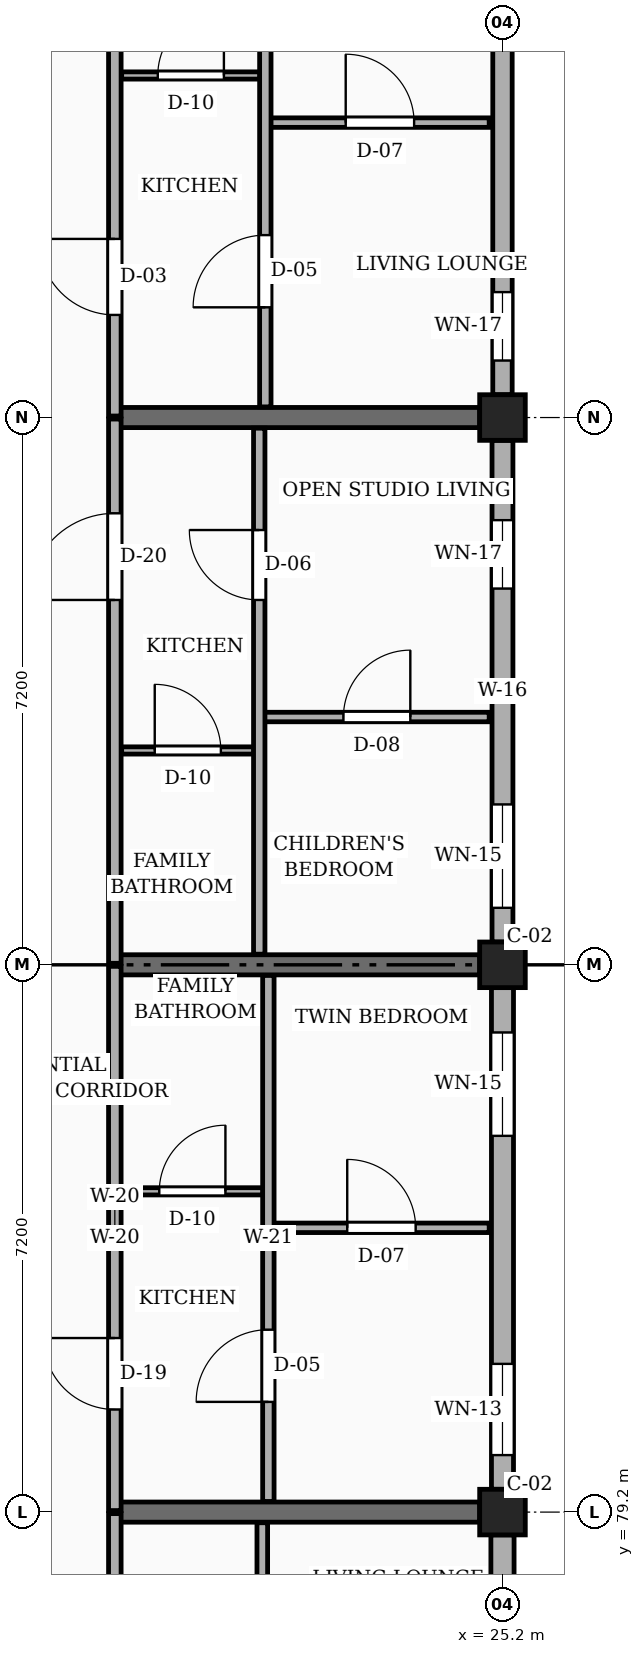
"""IFC4 building model, lengths in metres.
Left out: names, types, materials, properties, quantities, classifications, styles, units other than length and angle.
Written with IfcOpenShell. Run it as: python <this file> out.ifc"""

import sys

from ifc_helpers import new_model, si_unit, direction, frame, frame_2d, origin, origin_2d, place, context, subcontext, project, spatial, rectangle, extrude, element, fill, save


model = new_model("IFC4")
c1 = context("Model", 3, precision=1e-05, world=origin(), true_north=direction((0.0, 1.0)))
c2 = subcontext(c1, "Body", "Model", "MODEL_VIEW")
j1 = project(units=[si_unit("LENGTHUNIT", "METRE"), si_unit("PLANEANGLEUNIT", "RADIAN")], contexts=[c1])
p1 = place(None, origin())
s1 = spatial("IfcSite", under=j1, at=p1, CompositionType="ELEMENT")
p2 = place(p1, origin())
s2 = spatial("IfcBuilding", under=s1, at=p2, CompositionType="ELEMENT")
p3 = place(p2, frame((0.0, 0.0, 4.5)))
s3 = spatial("IfcBuildingStorey", under=s2, at=p3, CompositionType="ELEMENT", Elevation=4.5)
for number, where, z_axis, x_axis in (
    (1, (25.2, 79.2, 0.0), (0.0, 0.0, 1.0), (1.0, 0.0, 0.0)),
    (2, (25.2, 86.4, 0.0), (0.0, 0.0, 1.0), (1.0, 0.0, 0.0)),
    (3, (25.2, 93.6, 0.0), (0.0, 0.0, 1.0), (1.0, 0.0, 0.0)),
):
    element("IfcColumn", number, at=place(p3, frame(where, z_axis=z_axis, x_axis=x_axis)), inside=s3, PredefinedType="COLUMN", context=c2, shape_type="SweptSolid", body=[
        extrude(rectangle(XDim=0.6, YDim=0.6, at=origin_2d()), origin(), (0.0, 0.0, 1.0), 3.15),
    ])
for number, where, z_axis, x_axis in (
    (4, (20.1, 79.2, 0.0), (0.0, 0.0, 1.0), (1.0, 0.0, 0.0)),
    (5, (20.1, 86.4, 0.0), (0.0, 0.0, 1.0), (1.0, 0.0, 0.0)),
    (6, (20.1, 93.6, 0.0), (0.0, 0.0, 1.0), (1.0, 0.0, 0.0)),
):
    element("IfcWall", number, at=place(p3, frame(where, z_axis=z_axis, x_axis=x_axis)), inside=s3, PredefinedType="SOLIDWALL", context=c2, shape_type="SweptSolid", body=[
        extrude(rectangle(XDim=4.8, YDim=0.265, at=frame_2d((2.4, 0.0))), origin(), (0.0, 0.0, 1.0), 2.21),
    ])
p4 = place(p3, frame((25.2, 72.3, 0.0), z_axis=(0.0, 0.0, 1.0), x_axis=(0.0, 1.0, 0.0)))
e7 = element("IfcWall", 7, at=p4, inside=s3, PredefinedType="SOLIDWALL", context=c2, shape_type="SweptSolid", body=[
    extrude(rectangle(XDim=6.6, YDim=0.305, at=frame_2d((3.3, 0.0))), origin(), (0.0, 0.0, 1.0), 2.48),
])
p5 = place(p4, frame((0.45, 0.0, 0.78)))
e8 = element("IfcOpeningElement", 8, at=p5, cuts=e7, PredefinedType="OPENING", context=c2, shape_type="SweptSolid", body=[
    extrude(rectangle(XDim=1.04, YDim=1.26, at=frame_2d((0.52, 0.63))), frame((0.0, 0.163, 0.0), z_axis=(0.0, -1.0, 0.0), x_axis=(1.0, 0.0, 0.0)), (0.0, 0.0, 1.0), 0.325),
])
p6 = place(p4, frame((4.65, 0.0, 0.78)))
e9 = element("IfcOpeningElement", 9, at=p6, cuts=e7, PredefinedType="OPENING", context=c2, shape_type="SweptSolid", body=[
    extrude(rectangle(XDim=1.2, YDim=1.26, at=frame_2d((0.6, 0.63))), frame((0.0, 0.163, 0.0), z_axis=(0.0, -1.0, 0.0), x_axis=(1.0, 0.0, 0.0)), (0.0, 0.0, 1.0), 0.325),
])
p7 = place(p3, frame((25.2, 79.5, 0.0), z_axis=(0.0, 0.0, 1.0), x_axis=(0.0, 1.0, 0.0)))
e10 = element("IfcWall", 10, at=p7, inside=s3, PredefinedType="SOLIDWALL", context=c2, shape_type="SweptSolid", body=[
    extrude(rectangle(XDim=6.6, YDim=0.29, at=frame_2d((3.3, 0.0))), origin(), (0.0, 0.0, 1.0), 2.48),
])
p8 = place(p7, frame((0.45, 0.0, 0.78)))
e11 = element("IfcOpeningElement", 11, at=p8, cuts=e10, PredefinedType="OPENING", context=c2, shape_type="SweptSolid", body=[
    extrude(rectangle(XDim=1.2, YDim=1.26, at=frame_2d((0.6, 0.63))), frame((0.0, 0.155, 0.0), z_axis=(0.0, -1.0, 0.0), x_axis=(1.0, 0.0, 0.0)), (0.0, 0.0, 1.0), 0.31),
])
p9 = place(p7, frame((4.65, 0.0, 0.78)))
e12 = element("IfcOpeningElement", 12, at=p9, cuts=e10, PredefinedType="OPENING", context=c2, shape_type="SweptSolid", body=[
    extrude(rectangle(XDim=1.36, YDim=1.26, at=frame_2d((0.68, 0.63))), frame((0.0, 0.155, 0.0), z_axis=(0.0, -1.0, 0.0), x_axis=(1.0, 0.0, 0.0)), (0.0, 0.0, 1.0), 0.31),
])
p10 = place(p3, frame((25.2, 86.7, 0.0), z_axis=(0.0, 0.0, 1.0), x_axis=(0.0, 1.0, 0.0)))
e13 = element("IfcWall", 13, at=p10, inside=s3, PredefinedType="SOLIDWALL", context=c2, shape_type="SweptSolid", body=[
    extrude(rectangle(XDim=6.6, YDim=0.275, at=frame_2d((3.3, 0.0))), origin(), (0.0, 0.0, 1.0), 2.48),
])
p11 = place(p10, frame((0.45, 0.0, 0.78)))
e14 = element("IfcOpeningElement", 14, at=p11, cuts=e13, PredefinedType="OPENING", context=c2, shape_type="SweptSolid", body=[
    extrude(rectangle(XDim=1.36, YDim=1.26, at=frame_2d((0.68, 0.63))), frame((0.0, 0.147, 0.0), z_axis=(0.0, -1.0, 0.0), x_axis=(1.0, 0.0, 0.0)), (0.0, 0.0, 1.0), 0.295),
])
p12 = place(p10, frame((4.65, 0.0, 0.78)))
e15 = element("IfcOpeningElement", 15, at=p12, cuts=e13, PredefinedType="OPENING", context=c2, shape_type="SweptSolid", body=[
    extrude(rectangle(XDim=0.9, YDim=1.36, at=frame_2d((0.45, 0.68))), frame((0.0, 0.147, 0.0), z_axis=(0.0, -1.0, 0.0), x_axis=(1.0, 0.0, 0.0)), (0.0, 0.0, 1.0), 0.295),
])
p13 = place(p3, frame((25.2, 93.9, 0.0), z_axis=(0.0, 0.0, 1.0), x_axis=(0.0, 1.0, 0.0)))
e16 = element("IfcWall", 16, at=p13, inside=s3, PredefinedType="SOLIDWALL", context=c2, shape_type="SweptSolid", body=[
    extrude(rectangle(XDim=6.6, YDim=0.255, at=frame_2d((3.3, 0.0))), origin(), (0.0, 0.0, 1.0), 2.48),
])
p14 = place(p13, frame((0.45, 0.0, 0.78)))
e17 = element("IfcOpeningElement", 17, at=p14, cuts=e16, PredefinedType="OPENING", context=c2, shape_type="SweptSolid", body=[
    extrude(rectangle(XDim=0.9, YDim=1.36, at=frame_2d((0.45, 0.68))), frame((0.0, 0.137, 0.0), z_axis=(0.0, -1.0, 0.0), x_axis=(1.0, 0.0, 0.0)), (0.0, 0.0, 1.0), 0.275),
])
p15 = place(p13, frame((4.65, 0.0, 0.78)))
e18 = element("IfcOpeningElement", 18, at=p15, cuts=e16, PredefinedType="OPENING", context=c2, shape_type="SweptSolid", body=[
    extrude(rectangle(XDim=1.06, YDim=1.36, at=frame_2d((0.53, 0.68))), frame((0.0, 0.137, 0.0), z_axis=(0.0, -1.0, 0.0), x_axis=(1.0, 0.0, 0.0)), (0.0, 0.0, 1.0), 0.275),
])
p16 = place(p3, frame((20.1, 72.02, 0.0), z_axis=(0.0, 0.0, 1.0), x_axis=(0.0, 1.0, 0.0)))
e19 = element("IfcWall", 19, at=p16, inside=s3, PredefinedType="PARTITIONING", context=c2, shape_type="SweptSolid", body=[
    extrude(rectangle(XDim=7.16, YDim=0.165, at=frame_2d((3.58, 0.0))), origin(), (0.0, 0.0, 1.0), 2.345),
])
p17 = place(p16, frame((4.78, 0.0, 0.0)))
e20 = element("IfcOpeningElement", 20, at=p17, cuts=e19, PredefinedType="OPENING", context=c2, shape_type="SweptSolid", body=[
    extrude(rectangle(XDim=1.0, YDim=2.15, at=frame_2d((0.5, 1.075))), frame((0.0, 0.093, 0.0), z_axis=(0.0, -1.0, 0.0), x_axis=(1.0, 0.0, 0.0)), (0.0, 0.0, 1.0), 0.185),
])
p18 = place(p3, frame((20.1, 79.22, 0.0), z_axis=(0.0, 0.0, 1.0), x_axis=(0.0, 1.0, 0.0)))
e21 = element("IfcWall", 21, at=p18, inside=s3, PredefinedType="PARTITIONING", context=c2, shape_type="SweptSolid", body=[
    extrude(rectangle(XDim=7.16, YDim=0.165, at=frame_2d((3.58, 0.0))), origin(), (0.0, 0.0, 1.0), 2.345),
])
p19 = place(p18, frame((1.33, 0.0, 0.0)))
e22 = element("IfcOpeningElement", 22, at=p19, cuts=e21, PredefinedType="OPENING", context=c2, shape_type="SweptSolid", body=[
    extrude(rectangle(XDim=0.94, YDim=2.12, at=frame_2d((0.47, 1.06))), frame((0.0, 0.093, 0.0), z_axis=(0.0, -1.0, 0.0), x_axis=(1.0, 0.0, 0.0)), (0.0, 0.0, 1.0), 0.185),
])
p20 = place(p3, frame((20.1, 86.42, 0.0), z_axis=(0.0, 0.0, 1.0), x_axis=(0.0, 1.0, 0.0)))
e23 = element("IfcWall", 23, at=p20, inside=s3, PredefinedType="PARTITIONING", context=c2, shape_type="SweptSolid", body=[
    extrude(rectangle(XDim=7.16, YDim=0.165, at=frame_2d((3.58, 0.0))), origin(), (0.0, 0.0, 1.0), 2.345),
])
p21 = place(p20, frame((4.78, 0.0, 0.0)))
e24 = element("IfcOpeningElement", 24, at=p21, cuts=e23, PredefinedType="OPENING", context=c2, shape_type="SweptSolid", body=[
    extrude(rectangle(XDim=1.14, YDim=2.18, at=frame_2d((0.57, 1.09))), frame((0.0, 0.093, 0.0), z_axis=(0.0, -1.0, 0.0), x_axis=(1.0, 0.0, 0.0)), (0.0, 0.0, 1.0), 0.185),
])
p22 = place(p3, frame((20.1, 93.62, 0.0), z_axis=(0.0, 0.0, 1.0), x_axis=(0.0, 1.0, 0.0)))
e25 = element("IfcWall", 25, at=p22, inside=s3, PredefinedType="PARTITIONING", context=c2, shape_type="SweptSolid", body=[
    extrude(rectangle(XDim=7.005, YDim=0.165, at=frame_2d((3.502, 0.0))), origin(), (0.0, 0.0, 1.0), 2.345),
])
p23 = place(p22, frame((1.33, 0.0, 0.0)))
e26 = element("IfcOpeningElement", 26, at=p23, cuts=e25, PredefinedType="OPENING", context=c2, shape_type="SweptSolid", body=[
    extrude(rectangle(XDim=1.0, YDim=2.15, at=frame_2d((0.5, 1.075))), frame((0.0, 0.093, 0.0), z_axis=(0.0, -1.0, 0.0), x_axis=(1.0, 0.0, 0.0)), (0.0, 0.0, 1.0), 0.185),
])
p24 = place(p3, frame((22.04, 72.14, 0.0), z_axis=(0.0, 0.0, 1.0), x_axis=(0.0, 1.0, 0.0)))
e27 = element("IfcWall", 27, at=p24, inside=s3, PredefinedType="PARTITIONING", context=c2, shape_type="SweptSolid", body=[
    extrude(rectangle(XDim=6.92, YDim=0.14, at=frame_2d((3.46, 0.0))), origin(), (0.0, 0.0, 1.0), 2.345),
])
p25 = place(p24, frame((4.66, 0.0, 0.0)))
e28 = element("IfcOpeningElement", 28, at=p25, cuts=e27, PredefinedType="OPENING", context=c2, shape_type="SweptSolid", body=[
    extrude(rectangle(XDim=0.92, YDim=2.1, at=frame_2d((0.46, 1.05))), frame((0.0, 0.08, 0.0), z_axis=(0.0, -1.0, 0.0), x_axis=(1.0, 0.0, 0.0)), (0.0, 0.0, 1.0), 0.16),
])
p26 = place(p3, frame((22.19, 82.94, 0.0), z_axis=(0.0, 0.0, 1.0), x_axis=(1.0, 0.0, 0.0)))
e29 = element("IfcWall", 29, at=p26, inside=s3, PredefinedType="PARTITIONING", context=c2, shape_type="SweptSolid", body=[
    extrude(rectangle(XDim=2.835, YDim=0.125, at=frame_2d((1.417, 0.0))), origin(), (0.0, 0.0, 1.0), 2.345),
])
p27 = place(p26, frame((0.968, 0.0, 0.0)))
e30 = element("IfcOpeningElement", 30, at=p27, cuts=e29, PredefinedType="OPENING", context=c2, shape_type="SweptSolid", body=[
    extrude(rectangle(XDim=0.9, YDim=2.1, at=frame_2d((0.45, 1.05))), frame((0.0, 0.073, 0.0), z_axis=(0.0, -1.0, 0.0), x_axis=(1.0, 0.0, 0.0)), (0.0, 0.0, 1.0), 0.145),
])
p28 = place(p3, frame((20.19, 83.42, 0.0), z_axis=(0.0, 0.0, 1.0), x_axis=(1.0, 0.0, 0.0)))
e31 = element("IfcWall", 31, at=p28, inside=s3, PredefinedType="PARTITIONING", context=c2, shape_type="SweptSolid", body=[
    extrude(rectangle(XDim=1.86, YDim=0.095, at=frame_2d((0.93, 0.0))), origin(), (0.0, 0.0, 1.0), 2.345),
])
p29 = place(p28, frame((0.495, 0.0, 0.0)))
e32 = element("IfcOpeningElement", 32, at=p29, cuts=e31, PredefinedType="OPENING", context=c2, shape_type="SweptSolid", body=[
    extrude(rectangle(XDim=0.87, YDim=2.05, at=frame_2d((0.435, 1.025))), frame((0.0, 0.058, 0.0), z_axis=(0.0, -1.0, 0.0), x_axis=(1.0, 0.0, 0.0)), (0.0, 0.0, 1.0), 0.115),
])
p30 = place(p3, frame((22.12, 79.34, 0.0), z_axis=(0.0, 0.0, 1.0), x_axis=(0.0, 1.0, 0.0)))
e33 = element("IfcWall", 33, at=p30, inside=s3, PredefinedType="PARTITIONING", context=c2, shape_type="SweptSolid", body=[
    extrude(rectangle(XDim=6.92, YDim=0.15, at=frame_2d((3.46, 0.0))), origin(), (0.0, 0.0, 1.0), 2.345),
])
p31 = place(p30, frame((1.31, 0.0, 0.0)))
e34 = element("IfcOpeningElement", 34, at=p31, cuts=e33, PredefinedType="OPENING", context=c2, shape_type="SweptSolid", body=[
    extrude(rectangle(XDim=0.95, YDim=2.1, at=frame_2d((0.475, 1.05))), frame((0.0, 0.085, 0.0), z_axis=(0.0, -1.0, 0.0), x_axis=(1.0, 0.0, 0.0)), (0.0, 0.0, 1.0), 0.17),
])
p32 = place(p3, frame((22.07, 89.66, 0.0), z_axis=(0.0, 0.0, 1.0), x_axis=(1.0, 0.0, 0.0)))
e35 = element("IfcWall", 35, at=p32, inside=s3, PredefinedType="PARTITIONING", context=c2, shape_type="SweptSolid", body=[
    extrude(rectangle(XDim=2.955, YDim=0.125, at=frame_2d((1.478, 0.0))), origin(), (0.0, 0.0, 1.0), 2.345),
])
p33 = place(p32, frame((1.038, 0.0, 0.0)))
e36 = element("IfcOpeningElement", 36, at=p33, cuts=e35, PredefinedType="OPENING", context=c2, shape_type="SweptSolid", body=[
    extrude(rectangle(XDim=0.88, YDim=2.08, at=frame_2d((0.44, 1.04))), frame((0.0, 0.073, 0.0), z_axis=(0.0, -1.0, 0.0), x_axis=(1.0, 0.0, 0.0)), (0.0, 0.0, 1.0), 0.145),
])
p34 = place(p3, frame((20.19, 89.22, 0.0), z_axis=(0.0, 0.0, 1.0), x_axis=(1.0, 0.0, 0.0)))
e37 = element("IfcWall", 37, at=p34, inside=s3, PredefinedType="PARTITIONING", context=c2, shape_type="SweptSolid", body=[
    extrude(rectangle(XDim=1.74, YDim=0.095, at=frame_2d((0.87, 0.0))), origin(), (0.0, 0.0, 1.0), 2.345),
])
p35 = place(p34, frame((0.435, 0.0, 0.0)))
e38 = element("IfcOpeningElement", 38, at=p35, cuts=e37, PredefinedType="OPENING", context=c2, shape_type="SweptSolid", body=[
    extrude(rectangle(XDim=0.87, YDim=2.05, at=frame_2d((0.435, 1.025))), frame((0.0, 0.058, 0.0), z_axis=(0.0, -1.0, 0.0), x_axis=(1.0, 0.0, 0.0)), (0.0, 0.0, 1.0), 0.115),
])
p36 = place(p3, frame((22.0, 86.54, 0.0), z_axis=(0.0, 0.0, 1.0), x_axis=(0.0, 1.0, 0.0)))
e39 = element("IfcWall", 39, at=p36, inside=s3, PredefinedType="PARTITIONING", context=c2, shape_type="SweptSolid", body=[
    extrude(rectangle(XDim=6.92, YDim=0.15, at=frame_2d((3.46, 0.0))), origin(), (0.0, 0.0, 1.0), 2.345),
])
p37 = place(p36, frame((4.66, 0.0, 0.0)))
e40 = element("IfcOpeningElement", 40, at=p37, cuts=e39, PredefinedType="OPENING", context=c2, shape_type="SweptSolid", body=[
    extrude(rectangle(XDim=0.92, YDim=2.1, at=frame_2d((0.46, 1.05))), frame((0.0, 0.085, 0.0), z_axis=(0.0, -1.0, 0.0), x_axis=(1.0, 0.0, 0.0)), (0.0, 0.0, 1.0), 0.17),
])
p38 = place(p3, frame((22.15, 97.48, 0.0), z_axis=(0.0, 0.0, 1.0), x_axis=(1.0, 0.0, 0.0)))
e41 = element("IfcWall", 41, at=p38, inside=s3, PredefinedType="PARTITIONING", context=c2, shape_type="SweptSolid", body=[
    extrude(rectangle(XDim=2.875, YDim=0.125, at=frame_2d((1.438, 0.0))), origin(), (0.0, 0.0, 1.0), 2.345),
])
p39 = place(p38, frame((0.988, 0.0, 0.0)))
e42 = element("IfcOpeningElement", 42, at=p39, cuts=e41, PredefinedType="OPENING", context=c2, shape_type="SweptSolid", body=[
    extrude(rectangle(XDim=0.9, YDim=2.1, at=frame_2d((0.45, 1.05))), frame((0.0, 0.073, 0.0), z_axis=(0.0, -1.0, 0.0), x_axis=(1.0, 0.0, 0.0)), (0.0, 0.0, 1.0), 0.145),
])
p40 = place(p3, frame((20.19, 98.1, 0.0), z_axis=(0.0, 0.0, 1.0), x_axis=(1.0, 0.0, 0.0)))
e43 = element("IfcWall", 43, at=p40, inside=s3, PredefinedType="PARTITIONING", context=c2, shape_type="SweptSolid", body=[
    extrude(rectangle(XDim=1.82, YDim=0.095, at=frame_2d((0.91, 0.0))), origin(), (0.0, 0.0, 1.0), 2.345),
])
p41 = place(p40, frame((0.475, 0.0, 0.0)))
e44 = element("IfcOpeningElement", 44, at=p41, cuts=e43, PredefinedType="OPENING", context=c2, shape_type="SweptSolid", body=[
    extrude(rectangle(XDim=0.87, YDim=2.05, at=frame_2d((0.435, 1.025))), frame((0.0, 0.058, 0.0), z_axis=(0.0, -1.0, 0.0), x_axis=(1.0, 0.0, 0.0)), (0.0, 0.0, 1.0), 0.115),
])
p42 = place(p3, frame((22.08, 93.74, 0.0), z_axis=(0.0, 0.0, 1.0), x_axis=(0.0, 1.0, 0.0)))
e45 = element("IfcWall", 45, at=p42, inside=s3, PredefinedType="PARTITIONING", context=c2, shape_type="SweptSolid", body=[
    extrude(rectangle(XDim=6.885, YDim=0.15, at=frame_2d((3.442, 0.0))), origin(), (0.0, 0.0, 1.0), 2.345),
])
p43 = place(p42, frame((1.31, 0.0, 0.0)))
e46 = element("IfcOpeningElement", 46, at=p43, cuts=e45, PredefinedType="OPENING", context=c2, shape_type="SweptSolid", body=[
    extrude(rectangle(XDim=0.95, YDim=2.1, at=frame_2d((0.475, 1.05))), frame((0.0, 0.085, 0.0), z_axis=(0.0, -1.0, 0.0), x_axis=(1.0, 0.0, 0.0)), (0.0, 0.0, 1.0), 0.17),
])
p44 = place(p8, origin())
e47 = element("IfcWindow", 47, at=p44, inside=s3, PartitioningType="SINGLE_PANEL", PredefinedType="WINDOW", context=c2, shape_type="SweptSolid", body=[
    extrude(rectangle(XDim=1.2, YDim=1.26, at=frame_2d((0.6, 0.63))), frame((0.0, 0.03, 0.0), z_axis=(0.0, -1.0, 0.0), x_axis=(1.0, 0.0, 0.0)), (0.0, 0.0, 1.0), 0.06),
])
fill(e11, e47)
p45 = place(p9, origin())
e48 = element("IfcWindow", 48, at=p45, inside=s3, PartitioningType="SINGLE_PANEL", PredefinedType="WINDOW", context=c2, shape_type="SweptSolid", body=[
    extrude(rectangle(XDim=1.36, YDim=1.26, at=frame_2d((0.68, 0.63))), frame((0.0, 0.03, 0.0), z_axis=(0.0, -1.0, 0.0), x_axis=(1.0, 0.0, 0.0)), (0.0, 0.0, 1.0), 0.06),
])
fill(e12, e48)
p46 = place(p11, origin())
e49 = element("IfcWindow", 49, at=p46, inside=s3, PartitioningType="SINGLE_PANEL", PredefinedType="WINDOW", context=c2, shape_type="SweptSolid", body=[
    extrude(rectangle(XDim=1.36, YDim=1.26, at=frame_2d((0.68, 0.63))), frame((0.0, 0.03, 0.0), z_axis=(0.0, -1.0, 0.0), x_axis=(1.0, 0.0, 0.0)), (0.0, 0.0, 1.0), 0.06),
])
fill(e14, e49)
p47 = place(p12, origin())
e50 = element("IfcWindow", 50, at=p47, inside=s3, PartitioningType="SINGLE_PANEL", PredefinedType="WINDOW", context=c2, shape_type="SweptSolid", body=[
    extrude(rectangle(XDim=0.9, YDim=1.36, at=frame_2d((0.45, 0.68))), frame((0.0, 0.03, 0.0), z_axis=(0.0, -1.0, 0.0), x_axis=(1.0, 0.0, 0.0)), (0.0, 0.0, 1.0), 0.06),
])
fill(e15, e50)
p48 = place(p14, origin())
e51 = element("IfcWindow", 51, at=p48, inside=s3, PartitioningType="SINGLE_PANEL", PredefinedType="WINDOW", context=c2, shape_type="SweptSolid", body=[
    extrude(rectangle(XDim=0.9, YDim=1.36, at=frame_2d((0.45, 0.68))), frame((0.0, 0.03, 0.0), z_axis=(0.0, -1.0, 0.0), x_axis=(1.0, 0.0, 0.0)), (0.0, 0.0, 1.0), 0.06),
])
fill(e17, e51)
p49 = place(p19, origin())
e52 = element("IfcDoor", 52, at=p49, inside=s3, OperationType="SINGLE_SWING_RIGHT", PredefinedType="DOOR", context=c2, shape_type="SweptSolid", body=[
    extrude(rectangle(XDim=0.94, YDim=2.12, at=frame_2d((0.47, 1.06))), frame((0.0, 0.025, 0.0), z_axis=(0.0, -1.0, 0.0), x_axis=(1.0, 0.0, 0.0)), (0.0, 0.0, 1.0), 0.05),
])
fill(e22, e52)
p50 = place(p21, origin())
e53 = element("IfcDoor", 53, at=p50, inside=s3, OperationType="SINGLE_SWING_LEFT", PredefinedType="DOOR", context=c2, shape_type="SweptSolid", body=[
    extrude(rectangle(XDim=1.14, YDim=2.18, at=frame_2d((0.57, 1.09))), frame((0.0, 0.025, 0.0), z_axis=(0.0, -1.0, 0.0), x_axis=(1.0, 0.0, 0.0)), (0.0, 0.0, 1.0), 0.05),
])
fill(e24, e53)
p51 = place(p23, origin())
e54 = element("IfcDoor", 54, at=p51, inside=s3, OperationType="SINGLE_SWING_RIGHT", PredefinedType="DOOR", context=c2, shape_type="SweptSolid", body=[
    extrude(rectangle(XDim=1.0, YDim=2.15, at=frame_2d((0.5, 1.075))), frame((0.0, 0.025, 0.0), z_axis=(0.0, -1.0, 0.0), x_axis=(1.0, 0.0, 0.0)), (0.0, 0.0, 1.0), 0.05),
])
fill(e26, e54)
p52 = place(p27, origin())
e55 = element("IfcDoor", 55, at=p52, inside=s3, OperationType="SINGLE_SWING_LEFT", PredefinedType="DOOR", context=c2, shape_type="SweptSolid", body=[
    extrude(rectangle(XDim=0.9, YDim=2.1, at=frame_2d((0.45, 1.05))), frame((0.0, 0.025, 0.0), z_axis=(0.0, -1.0, 0.0), x_axis=(1.0, 0.0, 0.0)), (0.0, 0.0, 1.0), 0.05),
])
fill(e30, e55)
p53 = place(p29, origin())
e56 = element("IfcDoor", 56, at=p53, inside=s3, OperationType="SINGLE_SWING_RIGHT", PredefinedType="DOOR", context=c2, shape_type="SweptSolid", body=[
    extrude(rectangle(XDim=0.87, YDim=2.05, at=frame_2d((0.435, 1.025))), frame((0.0, 0.025, 0.0), z_axis=(0.0, -1.0, 0.0), x_axis=(1.0, 0.0, 0.0)), (0.0, 0.0, 1.0), 0.05),
])
fill(e32, e56)
p54 = place(p31, origin())
e57 = element("IfcDoor", 57, at=p54, inside=s3, OperationType="SINGLE_SWING_LEFT", PredefinedType="DOOR", context=c2, shape_type="SweptSolid", body=[
    extrude(rectangle(XDim=0.95, YDim=2.1, at=frame_2d((0.475, 1.05))), frame((0.0, 0.025, 0.0), z_axis=(0.0, -1.0, 0.0), x_axis=(1.0, 0.0, 0.0)), (0.0, 0.0, 1.0), 0.05),
])
fill(e34, e57)
p55 = place(p33, origin())
e58 = element("IfcDoor", 58, at=p55, inside=s3, OperationType="SINGLE_SWING_RIGHT", PredefinedType="DOOR", context=c2, shape_type="SweptSolid", body=[
    extrude(rectangle(XDim=0.88, YDim=2.08, at=frame_2d((0.44, 1.04))), frame((0.0, 0.025, 0.0), z_axis=(0.0, -1.0, 0.0), x_axis=(1.0, 0.0, 0.0)), (0.0, 0.0, 1.0), 0.05),
])
fill(e36, e58)
p56 = place(p35, origin())
e59 = element("IfcDoor", 59, at=p56, inside=s3, OperationType="SINGLE_SWING_LEFT", PredefinedType="DOOR", context=c2, shape_type="SweptSolid", body=[
    extrude(rectangle(XDim=0.87, YDim=2.05, at=frame_2d((0.435, 1.025))), frame((0.0, 0.025, 0.0), z_axis=(0.0, -1.0, 0.0), x_axis=(1.0, 0.0, 0.0)), (0.0, 0.0, 1.0), 0.05),
])
fill(e38, e59)
p57 = place(p37, origin())
e60 = element("IfcDoor", 60, at=p57, inside=s3, OperationType="SINGLE_SWING_RIGHT", PredefinedType="DOOR", context=c2, shape_type="SweptSolid", body=[
    extrude(rectangle(XDim=0.92, YDim=2.1, at=frame_2d((0.46, 1.05))), frame((0.0, 0.025, 0.0), z_axis=(0.0, -1.0, 0.0), x_axis=(1.0, 0.0, 0.0)), (0.0, 0.0, 1.0), 0.05),
])
fill(e40, e60)
p58 = place(p39, origin())
e61 = element("IfcDoor", 61, at=p58, inside=s3, OperationType="SINGLE_SWING_LEFT", PredefinedType="DOOR", context=c2, shape_type="SweptSolid", body=[
    extrude(rectangle(XDim=0.9, YDim=2.1, at=frame_2d((0.45, 1.05))), frame((0.0, 0.025, 0.0), z_axis=(0.0, -1.0, 0.0), x_axis=(1.0, 0.0, 0.0)), (0.0, 0.0, 1.0), 0.05),
])
fill(e42, e61)
p59 = place(p41, origin())
e62 = element("IfcDoor", 62, at=p59, inside=s3, OperationType="SINGLE_SWING_RIGHT", PredefinedType="DOOR", context=c2, shape_type="SweptSolid", body=[
    extrude(rectangle(XDim=0.87, YDim=2.05, at=frame_2d((0.435, 1.025))), frame((0.0, 0.025, 0.0), z_axis=(0.0, -1.0, 0.0), x_axis=(1.0, 0.0, 0.0)), (0.0, 0.0, 1.0), 0.05),
])
fill(e44, e62)
p60 = place(p43, origin())
e63 = element("IfcDoor", 63, at=p60, inside=s3, OperationType="SINGLE_SWING_LEFT", PredefinedType="DOOR", context=c2, shape_type="SweptSolid", body=[
    extrude(rectangle(XDim=0.95, YDim=2.1, at=frame_2d((0.475, 1.05))), frame((0.0, 0.025, 0.0), z_axis=(0.0, -1.0, 0.0), x_axis=(1.0, 0.0, 0.0)), (0.0, 0.0, 1.0), 0.05),
])
fill(e46, e63)
save(model, sys.argv[1])
